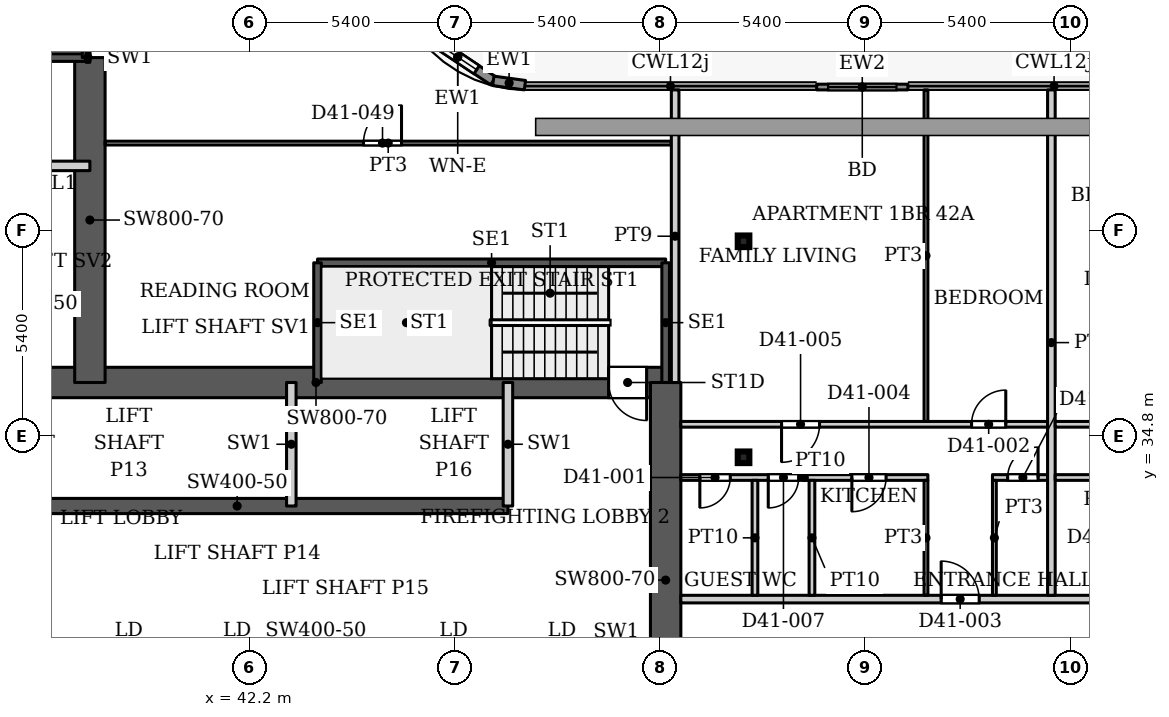
"""IFC4 building model, lengths in metres.
Left out: names, types, materials, properties, quantities, classifications, styles, units other than length and angle.
Written with IfcOpenShell. Run it as: python <this file> out.ifc"""

import sys

from ifc_helpers import new_model, si_unit, direction, frame, frame_2d, origin, origin_2d, place, context, subcontext, project, spatial, rectangle, hollow_rectangle, extrude, source, transform, mapped, element, fill, save


model = new_model("IFC4")
c1 = context("Model", 3, precision=1e-05, world=origin(), true_north=direction((0.0, 1.0)))
c2 = subcontext(c1, "Body", "Model", "MODEL_VIEW")
j1 = project(units=[si_unit("LENGTHUNIT", "METRE"), si_unit("PLANEANGLEUNIT", "RADIAN")], contexts=[c1])
p1 = place(None, origin())
s1 = spatial("IfcSite", under=j1, at=p1, CompositionType="ELEMENT")
p2 = place(p1, origin())
s2 = spatial("IfcBuilding", under=s1, at=p2, CompositionType="ELEMENT")
p3 = place(p2, frame((0.0, 0.0, 179.9)))
s3 = spatial("IfcBuildingStorey", under=s2, at=p3, CompositionType="ELEMENT", Elevation=179.9)
for number, where, z_axis, x_axis in (
    (1, (55.2, 34.232, 0.0), (0.0, 0.0, 1.0), (1.0, 0.0, 0.0)),
    (2, (55.2, 39.916, 0.0), (0.0, 0.0, 1.0), (1.0, 0.0, 0.0)),
):
    element("IfcColumn", number, at=place(p3, frame(where, z_axis=z_axis, x_axis=x_axis)), inside=s3, PredefinedType="COLUMN", context=c2, shape_type="SweptSolid", body=[
        extrude(hollow_rectangle(XDim=0.305, YDim=0.305, WallThickness=0.016, InnerFilletRadius=0.016, OuterFilletRadius=0.032, at=origin_2d()), origin(), (0.0, 0.0, 1.0), 3.9),
    ])
p4 = place(p3, frame((34.75, 32.95, 0.0), z_axis=(0.0, 0.0, 1.0), x_axis=(1.0, 0.0, 0.0)))
e3 = element("IfcWall", 3, at=p4, inside=s3, PredefinedType="SHEAR", context=c2, shape_type="SweptSolid", body=[
    extrude(rectangle(XDim=14.25, YDim=0.4, at=frame_2d((7.125, 0.0))), origin(), (0.0, 0.0, 1.0), 3.9),
])
p5 = place(p3, frame((34.75, 36.2, 0.0), z_axis=(0.0, 0.0, 1.0), x_axis=(1.0, 0.0, 0.0)))
e4 = element("IfcWall", 4, at=p5, inside=s3, PredefinedType="SHEAR", context=c2, shape_type="SweptSolid", body=[
    extrude(rectangle(XDim=18.4, YDim=0.8, at=frame_2d((9.2, 0.0))), origin(), (0.0, 0.0, 1.0), 3.9),
])
p6 = place(p5, frame((16.9, 0.0, 0.0)))
e5 = element("IfcOpeningElement", 5, at=p6, cuts=e4, PredefinedType="OPENING", context=c2, shape_type="SweptSolid", body=[
    extrude(rectangle(XDim=1.0, YDim=2.2, at=frame_2d((0.5, 1.1))), frame((0.0, 0.41, 0.0), z_axis=(0.0, -1.0, 0.0), x_axis=(1.0, 0.0, 0.0)), (0.0, 0.0, 1.0), 0.82),
])
p7 = place(p3, frame((38.0, 36.2, 0.0), z_axis=(0.0, 0.0, 1.0), x_axis=(0.0, 1.0, 0.0)))
e6 = element("IfcWall", 6, at=p7, inside=s3, PredefinedType="SHEAR", context=c2, shape_type="SweptSolid", body=[
    extrude(rectangle(XDim=8.55, YDim=0.8, at=frame_2d((4.275, 0.0))), origin(), (0.0, 0.0, 1.0), 3.9),
])
p8 = place(p3, frame((53.15, 25.8, 0.0), z_axis=(0.0, 0.0, 1.0), x_axis=(0.0, 1.0, 0.0)))
e7 = element("IfcWall", 7, at=p8, inside=s3, PredefinedType="SHEAR", context=c2, shape_type="SweptSolid", body=[
    extrude(rectangle(XDim=10.4, YDim=0.8, at=frame_2d((5.2, 0.0))), origin(), (0.0, 0.0, 1.0), 3.9),
])
p9 = place(p3, frame((46.743, 45.389, 0.0), z_axis=(0.0, 0.0, 1.0), x_axis=(0.831449265529, -0.555600682912, 0.0)))
e8 = element("IfcWall", 8, at=p9, inside=s3, PredefinedType="SOLIDWALL", context=c2, shape_type="SweptSolid", body=[
    extrude(rectangle(XDim=2.251, YDim=0.25, at=frame_2d((1.126, 0.0))), origin(), (0.0, 0.0, 1.0), 3.75),
])
p10 = place(p9, frame((0.525, 0.0, 0.6)))
e9 = element("IfcOpeningElement", 9, at=p10, cuts=e8, PredefinedType="OPENING", context=c2, shape_type="SweptSolid", body=[
    extrude(rectangle(XDim=1.2, YDim=2.1, at=frame_2d((0.6, 1.05))), frame((0.0, 0.135, 0.0), z_axis=(0.0, -1.0, 0.0), x_axis=(1.0, 0.0, 0.0)), (0.0, 0.0, 1.0), 0.27),
])
p11 = place(p3, frame((48.615, 44.138, 0.0), z_axis=(0.0, 0.0, 1.0), x_axis=(0.990741504246, -0.135761819977, 0.0)))
e10 = element("IfcWall", 10, at=p11, inside=s3, PredefinedType="SOLIDWALL", context=c2, shape_type="SweptSolid", body=[
    extrude(rectangle(XDim=0.84, YDim=0.25, at=frame_2d((0.42, 0.0))), origin(), (0.0, 0.0, 1.0), 3.75),
])
p12 = place(p3, frame((57.124, 43.975, 0.0), z_axis=(0.0, 0.0, 1.0), x_axis=(1.0, 0.0, 0.0)))
e11 = element("IfcWall", 11, at=p12, inside=s3, PredefinedType="SOLIDWALL", context=c2, shape_type="SweptSolid", body=[
    extrude(rectangle(XDim=2.4, YDim=0.15, at=frame_2d((1.2, 0.0))), origin(), (0.0, 0.0, 1.0), 3.75),
])
p13 = place(p12, frame((0.3, 0.0, 0.0)))
e12 = element("IfcOpeningElement", 12, at=p13, cuts=e11, PredefinedType="OPENING", context=c2, shape_type="SweptSolid", body=[
    extrude(rectangle(XDim=1.8, YDim=2.4, at=frame_2d((0.9, 1.2))), frame((0.0, 0.085, 0.0), z_axis=(0.0, -1.0, 0.0), x_axis=(1.0, 0.0, 0.0)), (0.0, 0.0, 1.0), 0.17),
])
p14 = place(p3, frame((43.99, 39.35, 0.0), z_axis=(0.0, 0.0, 1.0), x_axis=(1.0, 0.0, 0.0)))
e13 = element("IfcWall", 13, at=p14, inside=s3, PredefinedType="SHEAR", context=c2, shape_type="SweptSolid", body=[
    extrude(rectangle(XDim=9.16, YDim=0.2, at=frame_2d((4.58, 0.0))), origin(), (0.0, 0.0, 1.0), 3.9),
])
for number, where, z_axis, x_axis in (
    (14, (43.99, 36.2, 0.0), (0.0, 0.0, 1.0), (0.0, 1.0, 0.0)),
    (15, (53.15, 36.2, 0.0), (0.0, 0.0, 1.0), (0.0, 1.0, 0.0)),
):
    element("IfcWall", number, at=place(p3, frame(where, z_axis=z_axis, x_axis=x_axis)), inside=s3, PredefinedType="SHEAR", context=c2, shape_type="SweptSolid", body=[
        extrude(rectangle(XDim=3.15, YDim=0.2, at=frame_2d((1.575, 0.0))), origin(), (0.0, 0.0, 1.0), 3.9),
    ])
p15 = place(p3, frame((34.75, 44.75, 0.0), z_axis=(0.0, 0.0, 1.0), x_axis=(1.0, 0.0, 0.0)))
e16 = element("IfcWall", 16, at=p15, inside=s3, PredefinedType="SHEAR", context=c2, shape_type="SweptSolid", body=[
    extrude(rectangle(XDim=3.15, YDim=0.2, at=frame_2d((1.575, 0.0))), origin(), (0.0, 0.0, 1.0), 3.9),
])
p16 = place(p3, frame((37.9, 44.75, 0.0), z_axis=(0.0, 0.0, 1.0), x_axis=(0.0, 1.0, 0.0)))
e17 = element("IfcWall", 17, at=p16, inside=s3, PredefinedType="SHEAR", context=c2, shape_type="SweptSolid", body=[
    extrude(rectangle(XDim=9.16, YDim=0.2, at=frame_2d((4.58, 0.0))), origin(), (0.0, 0.0, 1.0), 3.9),
])
for number, where, z_axis, x_axis in (
    (18, (43.3, 32.95, 0.0), (0.0, 0.0, 1.0), (0.0, 1.0, 0.0)),
    (19, (49.0, 32.95, 0.0), (0.0, 0.0, 1.0), (0.0, 1.0, 0.0)),
    (20, (34.75, 41.9, 0.0), (0.0, 0.0, 1.0), (1.0, 0.0, 0.0)),
):
    element("IfcWall", number, at=place(p3, frame(where, z_axis=z_axis, x_axis=x_axis)), inside=s3, PredefinedType="PARTITIONING", context=c2, shape_type="SweptSolid", body=[
        extrude(rectangle(XDim=3.25, YDim=0.25, at=frame_2d((1.625, 0.0))), origin(), (0.0, 0.0, 1.0), 3.9),
    ])
p17 = place(p3, frame((37.9, 44.75, 0.0), z_axis=(0.0, 0.0, 1.0), x_axis=(1.0, 0.0, 0.0)))
e21 = element("IfcWall", 21, at=p17, inside=s3, PredefinedType="PARTITIONING", context=c2, shape_type="SweptSolid", body=[
    extrude(rectangle(XDim=0.1, YDim=0.25, at=frame_2d((0.05, 0.0))), origin(), (0.0, 0.0, 1.0), 3.9),
])
p18 = place(p3, frame((38.399, 42.5, 0.0), z_axis=(0.0, 0.0, 1.0), x_axis=(1.0, 0.0, 0.0)))
e22 = element("IfcWall", 22, at=p18, inside=s3, PredefinedType="PARTITIONING", context=c2, shape_type="SweptSolid", body=[
    extrude(rectangle(XDim=14.901, YDim=0.1, at=frame_2d((7.451, 0.0))), origin(), (0.0, 0.0, 1.0), 3.6),
])
p19 = place(p18, frame((6.801, 0.0, 0.0)))
e23 = element("IfcOpeningElement", 23, at=p19, cuts=e22, PredefinedType="OPENING", context=c2, shape_type="SweptSolid", body=[
    extrude(rectangle(XDim=1.0, YDim=2.1, at=frame_2d((0.5, 1.05))), frame((0.0, 0.06, 0.0), z_axis=(0.0, -1.0, 0.0), x_axis=(1.0, 0.0, 0.0)), (0.0, 0.0, 1.0), 0.12),
])
p20 = place(p3, frame((53.4, 36.199, 0.0), z_axis=(0.0, 0.0, 1.0), x_axis=(0.0, 1.0, 0.0)))
e24 = element("IfcWall", 24, at=p20, inside=s3, PredefinedType="PARTITIONING", context=c2, shape_type="SweptSolid", body=[
    extrude(rectangle(XDim=7.701, YDim=0.2, at=frame_2d((3.851, 0.0))), origin(), (0.0, 0.0, 1.0), 3.6),
])
p21 = place(p3, frame((53.549, 30.5, 0.0), z_axis=(0.0, 0.0, 1.0), x_axis=(1.0, 0.0, 0.0)))
e25 = element("IfcWall", 25, at=p21, inside=s3, PredefinedType="PARTITIONING", context=c2, shape_type="SweptSolid", body=[
    extrude(rectangle(XDim=44.551, YDim=0.2, at=frame_2d((22.275, 0.0))), origin(), (0.0, 0.0, 1.0), 3.6),
])
p22 = place(p21, frame((6.851, 0.0, 0.0)))
e26 = element("IfcOpeningElement", 26, at=p22, cuts=e25, PredefinedType="OPENING", context=c2, shape_type="SweptSolid", body=[
    extrude(rectangle(XDim=1.0, YDim=2.1, at=frame_2d((0.5, 1.05))), frame((0.0, 0.11, 0.0), z_axis=(0.0, -1.0, 0.0), x_axis=(1.0, 0.0, 0.0)), (0.0, 0.0, 1.0), 0.22),
])
p23 = place(p21, frame((13.451, 0.0, 0.0)))
e27 = element("IfcOpeningElement", 27, at=p23, cuts=e25, PredefinedType="OPENING", context=c2, shape_type="SweptSolid", body=[
    extrude(rectangle(XDim=1.0, YDim=2.1, at=frame_2d((0.5, 1.05))), frame((0.0, 0.11, 0.0), z_axis=(0.0, -1.0, 0.0), x_axis=(1.0, 0.0, 0.0)), (0.0, 0.0, 1.0), 0.22),
])
p24 = place(p21, frame((24.701, 0.0, 0.0)))
e28 = element("IfcOpeningElement", 28, at=p24, cuts=e25, PredefinedType="OPENING", context=c2, shape_type="SweptSolid", body=[
    extrude(rectangle(XDim=1.0, YDim=2.1, at=frame_2d((0.5, 1.05))), frame((0.0, 0.11, 0.0), z_axis=(0.0, -1.0, 0.0), x_axis=(1.0, 0.0, 0.0)), (0.0, 0.0, 1.0), 0.22),
])
p25 = place(p21, frame((38.651, 0.0, 0.0)))
e29 = element("IfcOpeningElement", 29, at=p25, cuts=e25, PredefinedType="OPENING", context=c2, shape_type="SweptSolid", body=[
    extrude(rectangle(XDim=1.0, YDim=2.1, at=frame_2d((0.5, 1.05))), frame((0.0, 0.11, 0.0), z_axis=(0.0, -1.0, 0.0), x_axis=(1.0, 0.0, 0.0)), (0.0, 0.0, 1.0), 0.22),
])
p26 = place(p3, frame((53.549, 33.7, 0.0), z_axis=(0.0, 0.0, 1.0), x_axis=(1.0, 0.0, 0.0)))
e30 = element("IfcWall", 30, at=p26, inside=s3, PredefinedType="PARTITIONING", context=c2, shape_type="SweptSolid", body=[
    extrude(rectangle(XDim=6.501, YDim=0.15, at=frame_2d((3.25, 0.0))), origin(), (0.0, 0.0, 1.0), 3.6),
])
p27 = place(p26, frame((0.501, 0.0, 0.0)))
e31 = element("IfcOpeningElement", 31, at=p27, cuts=e30, PredefinedType="OPENING", context=c2, shape_type="SweptSolid", body=[
    extrude(rectangle(XDim=0.8, YDim=2.1, at=frame_2d((0.4, 1.05))), frame((0.0, 0.085, 0.0), z_axis=(0.0, -1.0, 0.0), x_axis=(1.0, 0.0, 0.0)), (0.0, 0.0, 1.0), 0.17),
])
p28 = place(p26, frame((4.501, 0.0, 0.0)))
e32 = element("IfcOpeningElement", 32, at=p28, cuts=e30, PredefinedType="OPENING", context=c2, shape_type="SweptSolid", body=[
    extrude(rectangle(XDim=0.9, YDim=2.1, at=frame_2d((0.45, 1.05))), frame((0.0, 0.085, 0.0), z_axis=(0.0, -1.0, 0.0), x_axis=(1.0, 0.0, 0.0)), (0.0, 0.0, 1.0), 0.17),
])
p29 = place(p26, frame((2.301, 0.0, 0.0)))
e33 = element("IfcOpeningElement", 33, at=p29, cuts=e30, PredefinedType="OPENING", context=c2, shape_type="SweptSolid", body=[
    extrude(rectangle(XDim=0.8, YDim=2.1, at=frame_2d((0.4, 1.05))), frame((0.0, 0.085, 0.0), z_axis=(0.0, -1.0, 0.0), x_axis=(1.0, 0.0, 0.0)), (0.0, 0.0, 1.0), 0.17),
])
p30 = place(p3, frame((53.549, 35.1, 0.0), z_axis=(0.0, 0.0, 1.0), x_axis=(1.0, 0.0, 0.0)))
e34 = element("IfcWall", 34, at=p30, inside=s3, PredefinedType="PARTITIONING", context=c2, shape_type="SweptSolid", body=[
    extrude(rectangle(XDim=9.651, YDim=0.15, at=frame_2d((4.825, 0.0))), origin(), (0.0, 0.0, 1.0), 3.6),
])
p31 = place(p30, frame((7.651, 0.0, 0.0)))
e35 = element("IfcOpeningElement", 35, at=p31, cuts=e34, PredefinedType="OPENING", context=c2, shape_type="SweptSolid", body=[
    extrude(rectangle(XDim=0.9, YDim=2.1, at=frame_2d((0.45, 1.05))), frame((0.0, 0.085, 0.0), z_axis=(0.0, -1.0, 0.0), x_axis=(1.0, 0.0, 0.0)), (0.0, 0.0, 1.0), 0.17),
])
p32 = place(p30, frame((2.651, 0.0, 0.0)))
e36 = element("IfcOpeningElement", 36, at=p32, cuts=e34, PredefinedType="OPENING", context=c2, shape_type="SweptSolid", body=[
    extrude(rectangle(XDim=1.0, YDim=2.1, at=frame_2d((0.5, 1.05))), frame((0.0, 0.085, 0.0), z_axis=(0.0, -1.0, 0.0), x_axis=(1.0, 0.0, 0.0)), (0.0, 0.0, 1.0), 0.17),
])
for number, where, z_axis, x_axis in (
    (37, (55.5, 30.6, 0.0), (0.0, 0.0, 1.0), (0.0, 1.0, 0.0)),
    (38, (57.0, 30.6, 0.0), (0.0, 0.0, 1.0), (0.0, 1.0, 0.0)),
):
    element("IfcWall", number, at=place(p3, frame(where, z_axis=z_axis, x_axis=x_axis)), inside=s3, PredefinedType="PARTITIONING", context=c2, shape_type="SweptSolid", body=[
        extrude(rectangle(XDim=3.025, YDim=0.15, at=frame_2d((1.512, 0.0))), origin(), (0.0, 0.0, 1.0), 3.6),
    ])
p33 = place(p3, frame((60.0, 30.6, 0.0), z_axis=(0.0, 0.0, 1.0), x_axis=(0.0, 1.0, 0.0)))
e39 = element("IfcWall", 39, at=p33, inside=s3, PredefinedType="PARTITIONING", context=c2, shape_type="SweptSolid", body=[
    extrude(rectangle(XDim=3.025, YDim=0.1, at=frame_2d((1.512, 0.0))), origin(), (0.0, 0.0, 1.0), 3.6),
])
p34 = place(p3, frame((60.0, 35.175, 0.0), z_axis=(0.0, 0.0, 1.0), x_axis=(0.0, 1.0, 0.0)))
e40 = element("IfcWall", 40, at=p34, inside=s3, PredefinedType="PARTITIONING", context=c2, shape_type="SweptSolid", body=[
    extrude(rectangle(XDim=8.725, YDim=0.1, at=frame_2d((4.362, 0.0))), origin(), (0.0, 0.0, 1.0), 3.6),
])
p35 = place(p3, frame((61.75, 33.7, 0.0), z_axis=(0.0, 0.0, 1.0), x_axis=(1.0, 0.0, 0.0)))
e41 = element("IfcWall", 41, at=p35, inside=s3, PredefinedType="PARTITIONING", context=c2, shape_type="SweptSolid", body=[
    extrude(rectangle(XDim=1.45, YDim=0.15, at=frame_2d((0.725, 0.0))), origin(), (0.0, 0.0, 1.0), 3.6),
])
p36 = place(p35, frame((0.4, 0.0, 0.0)))
e42 = element("IfcOpeningElement", 42, at=p36, cuts=e41, PredefinedType="OPENING", context=c2, shape_type="SweptSolid", body=[
    extrude(rectangle(XDim=0.8, YDim=2.1, at=frame_2d((0.4, 1.05))), frame((0.0, 0.085, 0.0), z_axis=(0.0, -1.0, 0.0), x_axis=(1.0, 0.0, 0.0)), (0.0, 0.0, 1.0), 0.17),
])
p37 = place(p3, frame((61.8, 30.6, 0.0), z_axis=(0.0, 0.0, 1.0), x_axis=(0.0, 1.0, 0.0)))
e43 = element("IfcWall", 43, at=p37, inside=s3, PredefinedType="PARTITIONING", context=c2, shape_type="SweptSolid", body=[
    extrude(rectangle(XDim=3.025, YDim=0.1, at=frame_2d((1.512, 0.0))), origin(), (0.0, 0.0, 1.0), 3.6),
])
p38 = place(p3, frame((63.3, 30.6, 0.0), z_axis=(0.0, 0.0, 1.0), x_axis=(0.0, 1.0, 0.0)))
e44 = element("IfcWall", 44, at=p38, inside=s3, PredefinedType="PARTITIONING", context=c2, shape_type="SweptSolid", body=[
    extrude(rectangle(XDim=13.3, YDim=0.2, at=frame_2d((6.65, 0.0))), origin(), (0.0, 0.0, 1.0), 3.6),
])
p39 = place(p3, frame((63.4, 33.7, 0.0), z_axis=(0.0, 0.0, 1.0), x_axis=(1.0, 0.0, 0.0)))
e45 = element("IfcWall", 45, at=p39, inside=s3, PredefinedType="PARTITIONING", context=c2, shape_type="SweptSolid", body=[
    extrude(rectangle(XDim=2.825, YDim=0.15, at=frame_2d((1.413, 0.0))), origin(), (0.0, 0.0, 1.0), 3.6),
])
p40 = place(p39, frame((1.0, 0.0, 0.0)))
e46 = element("IfcOpeningElement", 46, at=p40, cuts=e45, PredefinedType="OPENING", context=c2, shape_type="SweptSolid", body=[
    extrude(rectangle(XDim=0.8, YDim=2.1, at=frame_2d((0.4, 1.05))), frame((0.0, 0.085, 0.0), z_axis=(0.0, -1.0, 0.0), x_axis=(1.0, 0.0, 0.0)), (0.0, 0.0, 1.0), 0.17),
])
p41 = place(p3, frame((63.4, 35.1, 0.0), z_axis=(0.0, 0.0, 1.0), x_axis=(1.0, 0.0, 0.0)))
e47 = element("IfcWall", 47, at=p41, inside=s3, PredefinedType="PARTITIONING", context=c2, shape_type="SweptSolid", body=[
    extrude(rectangle(XDim=14.2, YDim=0.15, at=frame_2d((7.1, 0.0))), origin(), (0.0, 0.0, 1.0), 3.6),
])
p42 = place(p41, frame((1.4, 0.0, 0.0)))
e48 = element("IfcOpeningElement", 48, at=p42, cuts=e47, PredefinedType="OPENING", context=c2, shape_type="SweptSolid", body=[
    extrude(rectangle(XDim=0.9, YDim=2.1, at=frame_2d((0.45, 1.05))), frame((0.0, 0.085, 0.0), z_axis=(0.0, -1.0, 0.0), x_axis=(1.0, 0.0, 0.0)), (0.0, 0.0, 1.0), 0.17),
])
p43 = place(p41, frame((10.95, 0.0, 0.0)))
e49 = element("IfcOpeningElement", 49, at=p43, cuts=e47, PredefinedType="OPENING", context=c2, shape_type="SweptSolid", body=[
    extrude(rectangle(XDim=1.0, YDim=2.1, at=frame_2d((0.5, 1.05))), frame((0.0, 0.085, 0.0), z_axis=(0.0, -1.0, 0.0), x_axis=(1.0, 0.0, 0.0)), (0.0, 0.0, 1.0), 0.17),
])
p44 = place(p41, frame((6.8, 0.0, 0.0)))
e50 = element("IfcOpeningElement", 50, at=p44, cuts=e47, PredefinedType="OPENING", context=c2, shape_type="SweptSolid", body=[
    extrude(rectangle(XDim=0.9, YDim=2.1, at=frame_2d((0.45, 1.05))), frame((0.0, 0.085, 0.0), z_axis=(0.0, -1.0, 0.0), x_axis=(1.0, 0.0, 0.0)), (0.0, 0.0, 1.0), 0.17),
])
m1 = source(origin(), c2, "Body", "SweptSolid", [
    extrude(rectangle(XDim=1.2, YDim=2.1, at=frame_2d((0.6, 1.05))), frame((0.0, 0.03, 0.0), z_axis=(0.0, -1.0, 0.0), x_axis=(1.0, 0.0, 0.0)), (0.0, 0.0, 1.0), 0.06),
])
p45 = place(p10, origin())
e51 = element("IfcWindow", 51, at=p45, inside=s3, PartitioningType="SINGLE_PANEL", PredefinedType="WINDOW", context=c2, shape_type="MappedRepresentation", body=[
    mapped(m1, transform((0.0, 0.0, 0.0), x_axis=(1.0, 0.0, 0.0), y_axis=(0.0, 1.0, 0.0), z_axis=(0.0, 0.0, 1.0), scale=1.0)),
])
fill(e9, e51)
m2 = source(origin(), c2, "Body", "SweptSolid", [
    extrude(rectangle(XDim=1.8, YDim=2.4, at=frame_2d((0.9, 1.2))), frame((0.0, 0.025, 0.0), z_axis=(0.0, -1.0, 0.0), x_axis=(1.0, 0.0, 0.0)), (0.0, 0.0, 1.0), 0.05),
])
p46 = place(p13, origin())
e52 = element("IfcDoor", 52, at=p46, inside=s3, OperationType="SLIDING_TO_LEFT", PredefinedType="DOOR", context=c2, shape_type="MappedRepresentation", body=[
    mapped(m2, transform((0.0, 0.0, 0.0), x_axis=(1.0, 0.0, 0.0), y_axis=(0.0, 1.0, 0.0), z_axis=(0.0, 0.0, 1.0), scale=1.0)),
])
fill(e12, e52)
m3 = source(origin(), c2, "Body", "SweptSolid", [
    extrude(rectangle(XDim=1.0, YDim=2.2, at=frame_2d((0.5, 1.1))), frame((0.0, 0.025, 0.0), z_axis=(0.0, -1.0, 0.0), x_axis=(1.0, 0.0, 0.0)), (0.0, 0.0, 1.0), 0.05),
])
p47 = place(p6, origin())
e53 = element("IfcDoor", 53, at=p47, inside=s3, OperationType="SINGLE_SWING_RIGHT", PredefinedType="DOOR", context=c2, shape_type="MappedRepresentation", body=[
    mapped(m3, transform((0.0, 0.0, 0.0), x_axis=(1.0, 0.0, 0.0), y_axis=(0.0, 1.0, 0.0), z_axis=(0.0, 0.0, 1.0), scale=1.0)),
])
fill(e5, e53)
m4 = source(origin(), c2, "Body", "SweptSolid", [
    extrude(rectangle(XDim=0.8, YDim=2.1, at=frame_2d((0.4, 1.05))), frame((0.0, 0.025, 0.0), z_axis=(0.0, -1.0, 0.0), x_axis=(1.0, 0.0, 0.0)), (0.0, 0.0, 1.0), 0.05),
])
p48 = place(p27, origin())
e54 = element("IfcDoor", 54, at=p48, inside=s3, OperationType="SINGLE_SWING_RIGHT", PredefinedType="DOOR", context=c2, shape_type="MappedRepresentation", body=[
    mapped(m4, transform((0.0, 0.0, 0.0), x_axis=(1.0, 0.0, 0.0), y_axis=(0.0, 1.0, 0.0), z_axis=(0.0, 0.0, 1.0), scale=1.0)),
])
fill(e31, e54)
m5 = source(origin(), c2, "Body", "SweptSolid", [
    extrude(rectangle(XDim=0.9, YDim=2.1, at=frame_2d((0.45, 1.05))), frame((0.0, 0.025, 0.0), z_axis=(0.0, -1.0, 0.0), x_axis=(1.0, 0.0, 0.0)), (0.0, 0.0, 1.0), 0.05),
])
p49 = place(p31, origin())
e55 = element("IfcDoor", 55, at=p49, inside=s3, OperationType="SINGLE_SWING_LEFT", PredefinedType="DOOR", context=c2, shape_type="MappedRepresentation", body=[
    mapped(m5, transform((0.0, 0.0, 0.0), x_axis=(1.0, 0.0, 0.0), y_axis=(0.0, 1.0, 0.0), z_axis=(0.0, 0.0, 1.0), scale=1.0)),
])
fill(e35, e55)
m6 = source(origin(), c2, "Body", "SweptSolid", [
    extrude(rectangle(XDim=1.0, YDim=2.1, at=frame_2d((0.5, 1.05))), frame((0.0, 0.025, 0.0), z_axis=(0.0, -1.0, 0.0), x_axis=(1.0, 0.0, 0.0)), (0.0, 0.0, 1.0), 0.05),
])
p50 = place(p22, origin())
e56 = element("IfcDoor", 56, at=p50, inside=s3, OperationType="SINGLE_SWING_LEFT", PredefinedType="DOOR", context=c2, shape_type="MappedRepresentation", body=[
    mapped(m6, transform((0.0, 0.0, 0.0), x_axis=(1.0, 0.0, 0.0), y_axis=(0.0, 1.0, 0.0), z_axis=(0.0, 0.0, 1.0), scale=1.0)),
])
fill(e26, e56)
p51 = place(p28, origin())
e57 = element("IfcDoor", 57, at=p51, inside=s3, OperationType="SINGLE_SWING_RIGHT", PredefinedType="DOOR", context=c2, shape_type="MappedRepresentation", body=[
    mapped(m5, transform((0.0, 0.0, 0.0), x_axis=(1.0, 0.0, 0.0), y_axis=(0.0, 1.0, 0.0), z_axis=(0.0, 0.0, 1.0), scale=1.0)),
])
fill(e32, e57)
m7 = source(origin(), c2, "Body", "SweptSolid", [
    extrude(rectangle(XDim=1.0, YDim=2.1, at=frame_2d((0.5, 1.05))), frame((0.0, 0.025, 0.0), z_axis=(0.0, -1.0, 0.0), x_axis=(1.0, 0.0, 0.0)), (0.0, 0.0, 1.0), 0.05),
])
p52 = place(p32, origin())
e58 = element("IfcDoor", 58, at=p52, inside=s3, OperationType="SINGLE_SWING_RIGHT", PredefinedType="DOOR", context=c2, shape_type="MappedRepresentation", body=[
    mapped(m7, transform((0.0, 0.0, 0.0), x_axis=(1.0, 0.0, 0.0), y_axis=(0.0, 1.0, 0.0), z_axis=(0.0, 0.0, 1.0), scale=1.0)),
])
fill(e36, e58)
p53 = place(p36, origin())
e59 = element("IfcDoor", 59, at=p53, inside=s3, OperationType="SINGLE_SWING_LEFT", PredefinedType="DOOR", context=c2, shape_type="MappedRepresentation", body=[
    mapped(m4, transform((0.0, 0.0, 0.0), x_axis=(1.0, 0.0, 0.0), y_axis=(0.0, 1.0, 0.0), z_axis=(0.0, 0.0, 1.0), scale=1.0)),
])
fill(e42, e59)
p54 = place(p29, origin())
e60 = element("IfcDoor", 60, at=p54, inside=s3, OperationType="SINGLE_SWING_RIGHT", PredefinedType="DOOR", context=c2, shape_type="MappedRepresentation", body=[
    mapped(m4, transform((0.0, 0.0, 0.0), x_axis=(1.0, 0.0, 0.0), y_axis=(0.0, 1.0, 0.0), z_axis=(0.0, 0.0, 1.0), scale=1.0)),
])
fill(e33, e60)
p55 = place(p19, origin())
e61 = element("IfcDoor", 61, at=p55, inside=s3, OperationType="SINGLE_SWING_LEFT", PredefinedType="DOOR", context=c2, shape_type="MappedRepresentation", body=[
    mapped(m7, transform((0.0, 0.0, 0.0), x_axis=(1.0, 0.0, 0.0), y_axis=(0.0, 1.0, 0.0), z_axis=(0.0, 0.0, 1.0), scale=1.0)),
])
fill(e23, e61)
save(model, sys.argv[1])
